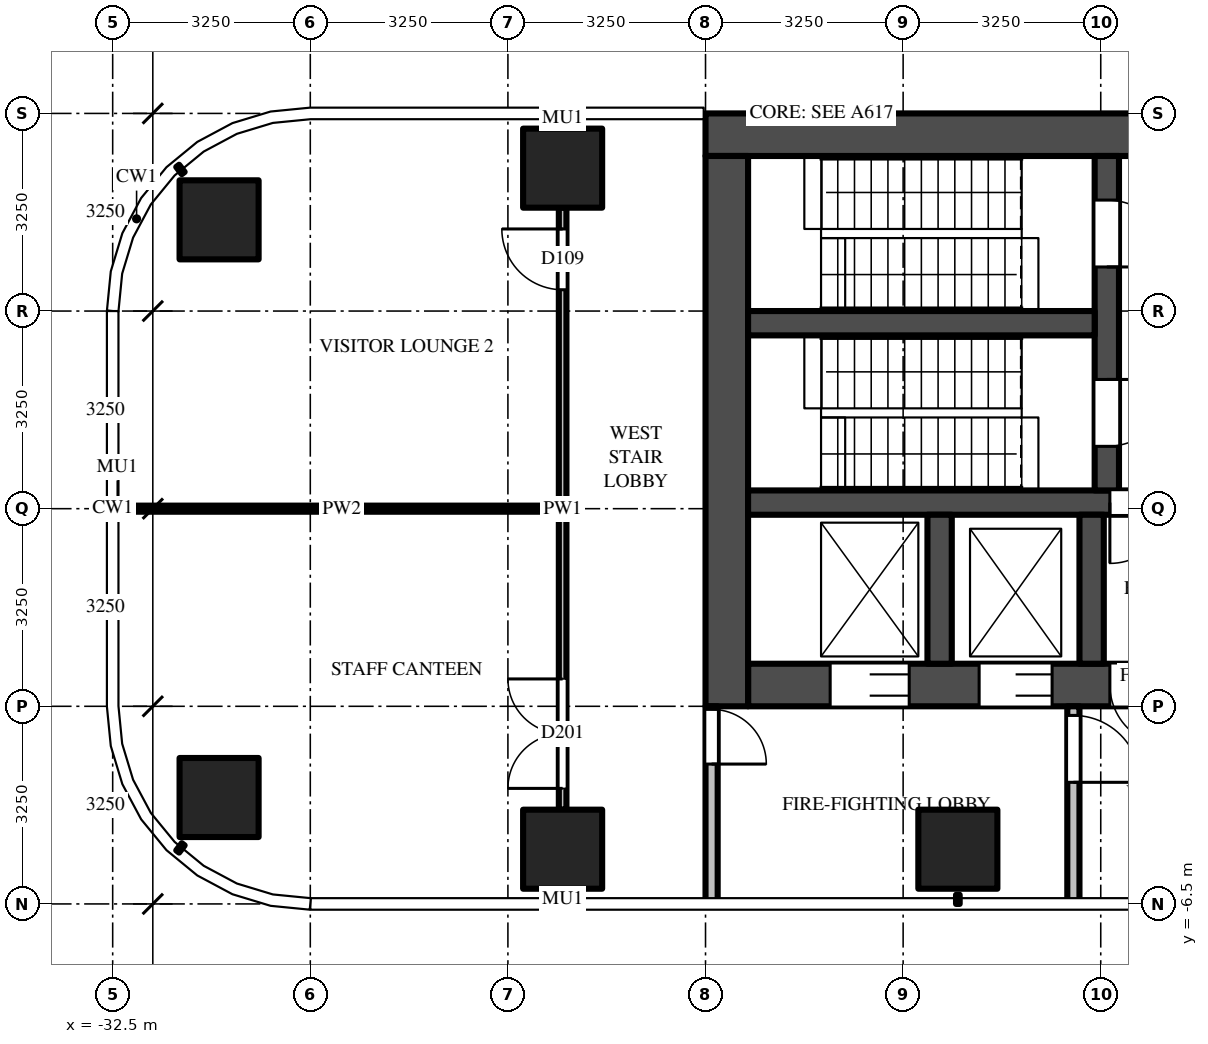
"""IFC4 building model, lengths in metres.
Left out: names, types, materials, properties, quantities, classifications, styles, units other than length and angle.
Written with IfcOpenShell. Run it as: python <this file> out.ifc"""

import sys

from ifc_helpers import new_model, si_unit, direction, frame, frame_2d, origin, origin_2d, place, context, subcontext, project, spatial, rectangle, extrude, source, transform, mapped, element, fill, save


model = new_model("IFC4")
c1 = context("Model", 3, precision=1e-05, world=origin(), true_north=direction((0.0, 1.0)))
c2 = subcontext(c1, "Body", "Model", "MODEL_VIEW")
j1 = project(units=[si_unit("LENGTHUNIT", "METRE"), si_unit("PLANEANGLEUNIT", "RADIAN")], contexts=[c1])
p1 = place(None, origin())
s1 = spatial("IfcSite", under=j1, at=p1, CompositionType="ELEMENT")
p2 = place(p1, origin())
s2 = spatial("IfcBuilding", under=s1, at=p2, CompositionType="ELEMENT")
p3 = place(p2, frame((0.0, 0.0, 151.5)))
s3 = spatial("IfcBuildingStorey", under=s2, at=p3, CompositionType="ELEMENT", Elevation=151.5)
m1 = source(origin(), c2, "Body", "SweptSolid", [
    extrude(rectangle(XDim=1.3, YDim=1.3, at=origin_2d()), origin(), (0.0, 0.0, 1.0), 4.5),
])
for number, where, z_axis, x_axis in (
    (1, (-18.6, -5.6, 0.0), (0.0, 0.0, 1.0), (1.0, 0.0, 0.0)),
    (2, (-25.1, -5.6, 0.0), (0.0, 0.0, 1.0), (1.0, 0.0, 0.0)),
    (3, (-30.75, -4.75, 0.0), (0.0, 0.0, 1.0), (1.0, 0.0, 0.0)),
    (4, (-25.1, 5.6, 0.0), (0.0, 0.0, 1.0), (1.0, 0.0, 0.0)),
    (5, (-30.75, 4.75, 0.0), (0.0, 0.0, 1.0), (1.0, 0.0, 0.0)),
):
    element("IfcColumn", number, at=place(p3, frame(where, z_axis=z_axis, x_axis=x_axis)), inside=s3, PredefinedType="COLUMN", context=c2, shape_type="MappedRepresentation", body=[
        mapped(m1, transform((0.0, 0.0, 0.0))),
    ])
m2 = source(origin(), c2, "Body", "SweptSolid", [
    extrude(rectangle(XDim=16.5, YDim=0.7, at=frame_2d((8.25, 0.0))), origin(), (0.0, 0.0, 1.0), 4.15),
])
p4 = place(p3, frame((-6.25, 6.15, 0.0), z_axis=(0.0, 0.0, 1.0), x_axis=(-1.0, 0.0, 0.0)))
e6 = element("IfcWall", 6, at=p4, inside=s3, PredefinedType="SHEAR", context=c2, shape_type="MappedRepresentation", body=[
    mapped(m2, transform((0.0, 0.0, 0.0))),
])
m3 = source(origin(), c2, "Body", "SweptSolid", [
    extrude(rectangle(XDim=14.85, YDim=0.7, at=frame_2d((7.425, 0.0))), origin(), (0.0, 0.0, 1.0), 4.15),
])
p5 = place(p3, frame((-7.2, -2.9, 0.0), z_axis=(0.0, 0.0, 1.0), x_axis=(-1.0, 0.0, 0.0)))
e7 = element("IfcWall", 7, at=p5, inside=s3, PredefinedType="SHEAR", context=c2, shape_type="MappedRepresentation", body=[
    mapped(m3, transform((0.0, 0.0, 0.0))),
])
m4 = source(origin(), c2, "Body", "SweptSolid", [
    extrude(rectangle(XDim=1.3, YDim=2.1, at=frame_2d((0.65, 1.05))), frame((0.0, 0.36, 0.0), z_axis=(0.0, -1.0, 0.0), x_axis=(1.0, 0.0, 0.0)), (0.0, 0.0, 1.0), 0.72),
])
p6 = place(p5, frame((12.2, 0.0, 0.0)))
e8 = element("IfcOpeningElement", 8, at=p6, cuts=e7, PredefinedType="OPENING", context=c2, shape_type="MappedRepresentation", body=[
    mapped(m4, transform((0.0, 0.0, 0.0))),
])
m5 = source(origin(), c2, "Body", "SweptSolid", [
    extrude(rectangle(XDim=1.2, YDim=2.1, at=frame_2d((0.6, 1.05))), frame((0.0, 0.36, 0.0), z_axis=(0.0, -1.0, 0.0), x_axis=(1.0, 0.0, 0.0)), (0.0, 0.0, 1.0), 0.72),
])
p7 = place(p5, frame((9.85, 0.0, 0.0)))
e9 = element("IfcOpeningElement", 9, at=p7, cuts=e7, PredefinedType="OPENING", context=c2, shape_type="MappedRepresentation", body=[
    mapped(m5, transform((0.0, 0.0, 0.0))),
])
m6 = source(origin(), c2, "Body", "SweptSolid", [
    extrude(rectangle(XDim=1.0, YDim=2.1, at=frame_2d((0.5, 1.05))), frame((0.0, 0.36, 0.0), z_axis=(0.0, -1.0, 0.0), x_axis=(1.0, 0.0, 0.0)), (0.0, 0.0, 1.0), 0.72),
])
p8 = place(p5, frame((7.9, 0.0, 0.0)))
e10 = element("IfcOpeningElement", 10, at=p8, cuts=e7, PredefinedType="OPENING", context=c2, shape_type="MappedRepresentation", body=[
    mapped(m6, transform((0.0, 0.0, 0.0))),
])
m7 = source(origin(), c2, "Body", "SweptSolid", [
    extrude(rectangle(XDim=0.9, YDim=2.1, at=frame_2d((0.45, 1.05))), frame((0.0, 0.36, 0.0), z_axis=(0.0, -1.0, 0.0), x_axis=(1.0, 0.0, 0.0)), (0.0, 0.0, 1.0), 0.72),
])
p9 = place(p5, frame((0.65, 0.0, 0.0)))
e11 = element("IfcOpeningElement", 11, at=p9, cuts=e7, PredefinedType="OPENING", context=c2, shape_type="MappedRepresentation", body=[
    mapped(m7, transform((0.0, 0.0, 0.0))),
])
p10 = place(p5, frame((3.25, 0.0, 0.0)))
e12 = element("IfcOpeningElement", 12, at=p10, cuts=e7, PredefinedType="OPENING", context=c2, shape_type="MappedRepresentation", body=[
    mapped(m7, transform((0.0, 0.0, 0.0))),
])
p11 = place(p5, frame((5.85, 0.0, 0.0)))
e13 = element("IfcOpeningElement", 13, at=p11, cuts=e7, PredefinedType="OPENING", context=c2, shape_type="MappedRepresentation", body=[
    mapped(m7, transform((0.0, 0.0, 0.0))),
])
m8 = source(origin(), c2, "Body", "SweptSolid", [
    extrude(rectangle(XDim=9.05, YDim=0.7, at=frame_2d((4.525, 0.0))), origin(), (0.0, 0.0, 1.0), 4.15),
])
p12 = place(p3, frame((-22.4, 5.8, 0.0), z_axis=(0.0, 0.0, 1.0), x_axis=(0.0, -1.0, 0.0)))
e14 = element("IfcWall", 14, at=p12, inside=s3, PredefinedType="SHEAR", context=c2, shape_type="MappedRepresentation", body=[
    mapped(m8, transform((0.0, 0.0, 0.0))),
])
m9 = source(origin(), c2, "Body", "SweptSolid", [
    extrude(rectangle(XDim=14.85, YDim=0.4, at=frame_2d((7.425, 0.0))), origin(), (0.0, 0.0, 1.0), 4.15),
])
p13 = place(p3, frame((-7.2, 0.1, 0.0), z_axis=(0.0, 0.0, 1.0), x_axis=(-1.0, 0.0, 0.0)))
e15 = element("IfcWall", 15, at=p13, inside=s3, PredefinedType="SHEAR", context=c2, shape_type="MappedRepresentation", body=[
    mapped(m9, transform((0.0, 0.0, 0.0))),
])
m10 = source(origin(), c2, "Body", "SweptSolid", [
    extrude(rectangle(XDim=1.0, YDim=2.1, at=frame_2d((0.5, 1.05))), frame((0.0, 0.21, 0.0), z_axis=(0.0, -1.0, 0.0), x_axis=(1.0, 0.0, 0.0)), (0.0, 0.0, 1.0), 0.42),
])
p14 = place(p13, frame((7.9, 0.0, 0.0)))
e16 = element("IfcOpeningElement", 16, at=p14, cuts=e15, PredefinedType="OPENING", context=c2, shape_type="MappedRepresentation", body=[
    mapped(m10, transform((0.0, 0.0, 0.0))),
])
m11 = source(origin(), c2, "Body", "SweptSolid", [
    extrude(rectangle(XDim=5.5, YDim=0.4, at=frame_2d((2.75, 0.0))), origin(), (0.0, 0.0, 1.0), 4.15),
])
p15 = place(p3, frame((-16.15, 5.8, 0.0), z_axis=(0.0, 0.0, 1.0), x_axis=(0.0, -1.0, 0.0)))
e17 = element("IfcWall", 17, at=p15, inside=s3, PredefinedType="SHEAR", context=c2, shape_type="MappedRepresentation", body=[
    mapped(m11, transform((0.0, 0.0, 0.0))),
])
m12 = source(origin(), c2, "Body", "SweptSolid", [
    extrude(rectangle(XDim=1.1, YDim=2.1, at=frame_2d((0.55, 1.05))), frame((0.0, 0.21, 0.0), z_axis=(0.0, -1.0, 0.0), x_axis=(1.0, 0.0, 0.0)), (0.0, 0.0, 1.0), 0.42),
])
p16 = place(p15, frame((0.725, 0.0, 0.0)))
e18 = element("IfcOpeningElement", 18, at=p16, cuts=e17, PredefinedType="OPENING", context=c2, shape_type="MappedRepresentation", body=[
    mapped(m12, transform((0.0, 0.0, 0.0))),
])
p17 = place(p15, frame((3.675, 0.0, 0.0)))
e19 = element("IfcOpeningElement", 19, at=p17, cuts=e17, PredefinedType="OPENING", context=c2, shape_type="MappedRepresentation", body=[
    mapped(m12, transform((0.0, 0.0, 0.0))),
])
m13 = source(origin(), c2, "Body", "SweptSolid", [
    extrude(rectangle(XDim=5.7, YDim=0.4, at=frame_2d((2.85, 0.0))), origin(), (0.0, 0.0, 1.0), 4.15),
])
p18 = place(p3, frame((-16.35, 3.05, 0.0), z_axis=(0.0, 0.0, 1.0), x_axis=(-1.0, 0.0, 0.0)))
e20 = element("IfcWall", 20, at=p18, inside=s3, PredefinedType="SHEAR", context=c2, shape_type="MappedRepresentation", body=[
    mapped(m13, transform((0.0, 0.0, 0.0))),
])
m14 = source(origin(), c2, "Body", "SweptSolid", [
    extrude(rectangle(XDim=2.45, YDim=0.4, at=frame_2d((1.225, 0.0))), origin(), (0.0, 0.0, 1.0), 4.15),
])
for number, where, z_axis, x_axis in (
    (21, (-16.4, -0.1, 0.0), (0.0, 0.0, 1.0), (0.0, -1.0, 0.0)),
    (22, (-18.9, -0.1, 0.0), (0.0, 0.0, 1.0), (0.0, -1.0, 0.0)),
):
    element("IfcWall", number, at=place(p3, frame(where, z_axis=z_axis, x_axis=x_axis)), inside=s3, PredefinedType="SHEAR", context=c2, shape_type="MappedRepresentation", body=[
        mapped(m14, transform((0.0, 0.0, 0.0))),
    ])
m15 = source(origin(), c2, "Body", "SweptSolid", [
    extrude(rectangle(XDim=3.25, YDim=0.2, at=frame_2d((1.625, 0.0))), origin(), (0.0, 0.0, 1.0), 4.15),
])
p19 = place(p3, frame((-16.7, -3.25, 0.0), z_axis=(0.0, 0.0, 1.0), x_axis=(0.0, -1.0, 0.0)))
e23 = element("IfcWall", 23, at=p19, inside=s3, PredefinedType="PARTITIONING", context=c2, shape_type="MappedRepresentation", body=[
    mapped(m15, transform((0.0, 0.0, 0.0))),
])
m16 = source(origin(), c2, "Body", "SweptSolid", [
    extrude(rectangle(XDim=1.1, YDim=2.1, at=frame_2d((0.55, 1.05))), frame((0.0, 0.11, 0.0), z_axis=(0.0, -1.0, 0.0), x_axis=(1.0, 0.0, 0.0)), (0.0, 0.0, 1.0), 0.22),
])
p20 = place(p19, frame((0.15, 0.0, 0.0)))
e24 = element("IfcOpeningElement", 24, at=p20, cuts=e23, PredefinedType="OPENING", context=c2, shape_type="MappedRepresentation", body=[
    mapped(m16, transform((0.0, 0.0, 0.0))),
])
p21 = place(p3, frame((-22.65, -3.25, 0.0), z_axis=(0.0, 0.0, 1.0), x_axis=(0.0, -1.0, 0.0)))
e25 = element("IfcWall", 25, at=p21, inside=s3, PredefinedType="PARTITIONING", context=c2, shape_type="MappedRepresentation", body=[
    mapped(m15, transform((0.0, 0.0, 0.0))),
])
m17 = source(origin(), c2, "Body", "SweptSolid", [
    extrude(rectangle(XDim=0.9, YDim=2.1, at=frame_2d((0.45, 1.05))), frame((0.0, 0.11, 0.0), z_axis=(0.0, -1.0, 0.0), x_axis=(1.0, 0.0, 0.0)), (0.0, 0.0, 1.0), 0.22),
])
p22 = place(p21, frame((0.05, 0.0, 0.0)))
e26 = element("IfcOpeningElement", 26, at=p22, cuts=e25, PredefinedType="OPENING", context=c2, shape_type="MappedRepresentation", body=[
    mapped(m17, transform((0.0, 0.0, 0.0))),
])
p23 = place(p3, frame((-25.1, -4.95, 0.0), z_axis=(0.0, 0.0, 1.0), x_axis=(0.0, 1.0, 0.0)))
e27 = element("IfcWall", 27, at=p23, inside=s3, PredefinedType="PARTITIONING", context=c2, shape_type="SweptSolid", body=[
    extrude(rectangle(XDim=9.9, YDim=0.125, at=frame_2d((4.95, 0.0))), origin(), (0.0, 0.0, 1.0), 3.368),
])
m18 = source(origin(), c2, "Body", "SweptSolid", [
    extrude(rectangle(XDim=1.8, YDim=2.1, at=frame_2d((0.9, 1.05))), frame((0.0, 0.073, 0.0), z_axis=(0.0, -1.0, 0.0), x_axis=(1.0, 0.0, 0.0)), (0.0, 0.0, 1.0), 0.145),
])
p24 = place(p23, frame((0.35, 0.0, 0.0)))
e28 = element("IfcOpeningElement", 28, at=p24, cuts=e27, PredefinedType="OPENING", context=c2, shape_type="MappedRepresentation", body=[
    mapped(m18, transform((0.0, 0.0, 0.0))),
])
m19 = source(origin(), c2, "Body", "SweptSolid", [
    extrude(rectangle(XDim=1.0, YDim=2.1, at=frame_2d((0.5, 1.05))), frame((0.0, 0.073, 0.0), z_axis=(0.0, -1.0, 0.0), x_axis=(1.0, 0.0, 0.0)), (0.0, 0.0, 1.0), 0.145),
])
p25 = place(p23, frame((8.55, 0.0, 0.0)))
e29 = element("IfcOpeningElement", 29, at=p25, cuts=e27, PredefinedType="OPENING", context=c2, shape_type="MappedRepresentation", body=[
    mapped(m19, transform((0.0, 0.0, 0.0))),
])
p26 = place(p3, frame((-32.3, 0.0, 0.0), z_axis=(0.0, 0.0, 1.0), x_axis=(1.0, 0.0, 0.0)))
e30 = element("IfcWall", 30, at=p26, inside=s3, PredefinedType="PARTITIONING", context=c2, shape_type="SweptSolid", body=[
    extrude(rectangle(XDim=7.137, YDim=0.1, at=frame_2d((3.569, 0.0))), origin(), (0.0, 0.0, 1.0), 3.23),
])
m20 = source(origin(), c2, "Body", "SweptSolid", [
    extrude(rectangle(XDim=1.3, YDim=2.1, at=frame_2d((0.65, 1.05))), frame((0.0, -0.275, 0.0), z_axis=(0.0, -1.0, 0.0), x_axis=(1.0, 0.0, 0.0)), (0.0, 0.0, 1.0), 0.05),
])
p27 = place(p6, origin())
e31 = element("IfcDoor", 31, at=p27, inside=s3, OperationType="DOUBLE_DOOR_SLIDING", PredefinedType="DOOR", context=c2, shape_type="MappedRepresentation", body=[
    mapped(m20, transform((0.0, 0.0, 0.0))),
])
fill(e8, e31)
m21 = source(origin(), c2, "Body", "SweptSolid", [
    extrude(rectangle(XDim=1.2, YDim=2.1, at=frame_2d((0.6, 1.05))), frame((0.0, -0.275, 0.0), z_axis=(0.0, -1.0, 0.0), x_axis=(1.0, 0.0, 0.0)), (0.0, 0.0, 1.0), 0.05),
])
p28 = place(p7, origin())
e32 = element("IfcDoor", 32, at=p28, inside=s3, OperationType="DOUBLE_DOOR_SLIDING", PredefinedType="DOOR", context=c2, shape_type="MappedRepresentation", body=[
    mapped(m21, transform((0.0, 0.0, 0.0))),
])
fill(e9, e32)
m22 = source(origin(), c2, "Body", "SweptSolid", [
    extrude(rectangle(XDim=1.1, YDim=2.1, at=frame_2d((0.55, 1.05))), frame((0.0, 0.025, 0.0), z_axis=(0.0, -1.0, 0.0), x_axis=(1.0, 0.0, 0.0)), (0.0, 0.0, 1.0), 0.05),
])
p29 = place(p16, origin())
e33 = element("IfcDoor", 33, at=p29, inside=s3, OperationType="SINGLE_SWING_RIGHT", PredefinedType="DOOR", context=c2, shape_type="MappedRepresentation", body=[
    mapped(m22, transform((0.0, 0.0, 0.0))),
])
fill(e18, e33)
p30 = place(p17, origin())
e34 = element("IfcDoor", 34, at=p30, inside=s3, OperationType="SINGLE_SWING_LEFT", PredefinedType="DOOR", context=c2, shape_type="MappedRepresentation", body=[
    mapped(m22, transform((0.0, 0.0, 0.0))),
])
fill(e19, e34)
m23 = source(origin(), c2, "Body", "SweptSolid", [
    extrude(rectangle(XDim=1.0, YDim=2.1, at=frame_2d((0.5, 1.05))), frame((0.0, 0.025, 0.0), z_axis=(0.0, -1.0, 0.0), x_axis=(1.0, 0.0, 0.0)), (0.0, 0.0, 1.0), 0.05),
])
p31 = place(p14, origin())
e35 = element("IfcDoor", 35, at=p31, inside=s3, OperationType="SINGLE_SWING_RIGHT", PredefinedType="DOOR", context=c2, shape_type="MappedRepresentation", body=[
    mapped(m23, transform((0.0, 0.0, 0.0))),
])
fill(e16, e35)
m24 = source(origin(), c2, "Body", "SweptSolid", [
    extrude(rectangle(XDim=1.0, YDim=2.1, at=frame_2d((0.5, 1.05))), frame((0.0, -0.275, 0.0), z_axis=(0.0, -1.0, 0.0), x_axis=(1.0, 0.0, 0.0)), (0.0, 0.0, 1.0), 0.05),
])
p32 = place(p8, origin())
e36 = element("IfcDoor", 36, at=p32, inside=s3, OperationType="SINGLE_SWING_LEFT", PredefinedType="DOOR", context=c2, shape_type="MappedRepresentation", body=[
    mapped(m24, transform((0.0, 0.0, 0.0))),
])
fill(e10, e36)
p33 = place(p20, origin())
e37 = element("IfcDoor", 37, at=p33, inside=s3, OperationType="SINGLE_SWING_RIGHT", PredefinedType="DOOR", context=c2, shape_type="MappedRepresentation", body=[
    mapped(m22, transform((0.0, 0.0, 0.0))),
])
fill(e24, e37)
m25 = source(origin(), c2, "Body", "SweptSolid", [
    extrude(rectangle(XDim=0.9, YDim=2.1, at=frame_2d((0.45, 1.05))), frame((0.0, 0.025, 0.0), z_axis=(0.0, -1.0, 0.0), x_axis=(1.0, 0.0, 0.0)), (0.0, 0.0, 1.0), 0.05),
])
p34 = place(p22, origin())
e38 = element("IfcDoor", 38, at=p34, inside=s3, OperationType="SINGLE_SWING_RIGHT", PredefinedType="DOOR", context=c2, shape_type="MappedRepresentation", body=[
    mapped(m25, transform((0.0, 0.0, 0.0))),
])
fill(e26, e38)
m26 = source(origin(), c2, "Body", "SweptSolid", [
    extrude(rectangle(XDim=1.8, YDim=2.1, at=frame_2d((0.9, 1.05))), frame((0.0, 0.025, 0.0), z_axis=(0.0, -1.0, 0.0), x_axis=(1.0, 0.0, 0.0)), (0.0, 0.0, 1.0), 0.05),
])
p35 = place(p24, origin())
e39 = element("IfcDoor", 39, at=p35, inside=s3, OperationType="DOUBLE_DOOR_SINGLE_SWING", PredefinedType="DOOR", context=c2, shape_type="MappedRepresentation", body=[
    mapped(m26, transform((0.0, 0.0, 0.0))),
])
fill(e28, e39)
p36 = place(p25, origin())
e40 = element("IfcDoor", 40, at=p36, inside=s3, OperationType="SINGLE_SWING_RIGHT", PredefinedType="DOOR", context=c2, shape_type="MappedRepresentation", body=[
    mapped(m23, transform((0.0, 0.0, 0.0))),
])
fill(e29, e40)
save(model, sys.argv[1])
